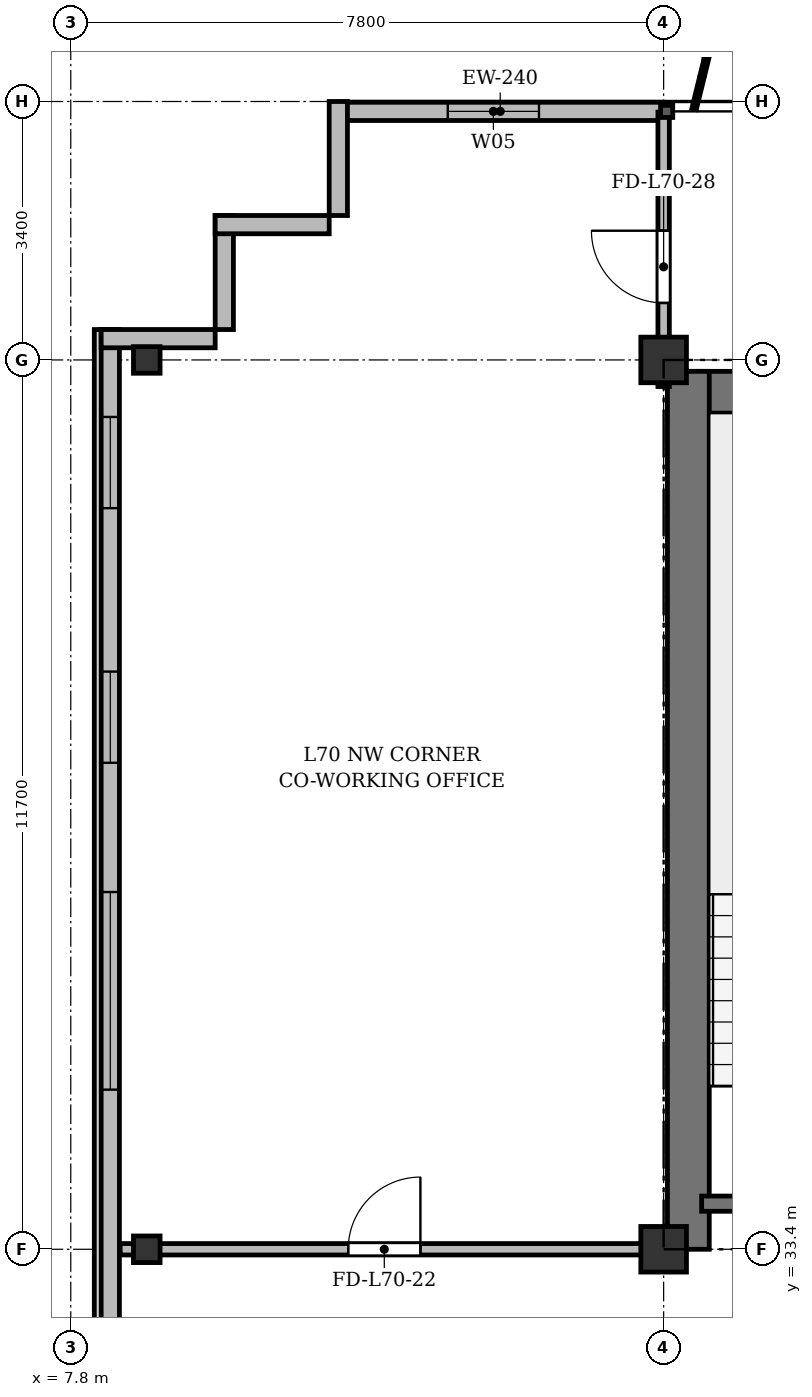
"""IFC4 building model, lengths in metres.
Left out: names, types, materials, properties, quantities, classifications, styles, units other than length and angle.
Written with IfcOpenShell. Run it as: python <this file> out.ifc"""

import sys

from ifc_helpers import new_model, si_unit, direction, frame, frame_2d, origin, origin_2d, place, context, subcontext, project, spatial, rectangle, i_section, extrude, source, transform, mapped, element, fill, save


model = new_model("IFC4")
c1 = context("Model", 3, precision=1e-05, world=origin(), true_north=direction((0.0, 1.0)))
c2 = subcontext(c1, "Body", "Model", "MODEL_VIEW")
j1 = project(units=[si_unit("LENGTHUNIT", "METRE"), si_unit("PLANEANGLEUNIT", "RADIAN")], contexts=[c1])
p1 = place(None, origin())
s1 = spatial("IfcSite", under=j1, at=p1, CompositionType="ELEMENT")
p2 = place(p1, origin())
s2 = spatial("IfcBuilding", under=s1, at=p2, CompositionType="ELEMENT")
p3 = place(p2, frame((0.0, 0.0, 270.3)))
s3 = spatial("IfcBuildingStorey", under=s2, at=p3, CompositionType="ELEMENT", Elevation=270.3)
m1 = source(origin(), c2, "Body", "SweptSolid", [
    extrude(i_section(OverallWidth=0.35, OverallDepth=0.35, WebThickness=0.018, FlangeThickness=0.028, at=origin_2d()), origin(), (0.0, 0.0, 1.0), 3.6),
])
for number, where, z_axis, x_axis in (
    (1, (8.8, 33.4, 0.0), (0.0, 0.0, 1.0), (1.0, 0.0, 0.0)),
    (2, (8.8, 45.1, 0.0), (0.0, 0.0, 1.0), (1.0, 0.0, 0.0)),
):
    element("IfcColumn", number, at=place(p3, frame(where, z_axis=z_axis, x_axis=x_axis)), inside=s3, PredefinedType="COLUMN", context=c2, shape_type="MappedRepresentation", body=[
        mapped(m1, transform((0.0, 0.0, 0.0), x_axis=(1.0, 0.0, 0.0), y_axis=(0.0, 1.0, 0.0), z_axis=(0.0, 0.0, 1.0), scale=1.0)),
    ])
m2 = source(origin(), c2, "Body", "SweptSolid", [
    extrude(rectangle(XDim=0.6, YDim=0.6, at=origin_2d()), origin(), (0.0, 0.0, 1.0), 3.6),
])
for number, where, z_axis, x_axis in (
    (3, (15.6, 33.4, 0.0), (0.0, 0.0, 1.0), (1.0, 0.0, 0.0)),
    (4, (15.6, 45.1, 0.0), (0.0, 0.0, 1.0), (1.0, 0.0, 0.0)),
):
    element("IfcColumn", number, at=place(p3, frame(where, z_axis=z_axis, x_axis=x_axis)), inside=s3, PredefinedType="COLUMN", context=c2, shape_type="MappedRepresentation", body=[
        mapped(m2, transform((0.0, 0.0, 0.0), x_axis=(1.0, 0.0, 0.0), y_axis=(0.0, 1.0, 0.0), z_axis=(0.0, 0.0, 1.0), scale=1.0)),
    ])
p4 = place(p3, frame((11.3, 48.37, 0.0), z_axis=(0.0, 0.0, 1.0), x_axis=(1.0, 0.0, 0.0)))
e5 = element("IfcWall", 5, at=p4, inside=s3, PredefinedType="SOLIDWALL", context=c2, shape_type="SweptSolid", body=[
    extrude(rectangle(XDim=4.3, YDim=0.24, at=frame_2d((2.15, 0.0))), origin(), (0.0, 0.0, 1.0), 3.37),
])
p5 = place(p4, frame((1.46, 0.0, 0.9)))
e6 = element("IfcOpeningElement", 6, at=p5, cuts=e5, PredefinedType="OPENING", context=c2, shape_type="SweptSolid", body=[
    extrude(rectangle(XDim=1.2, YDim=1.65, at=frame_2d((0.6, 0.825))), frame((0.0, 0.13, 0.0), z_axis=(0.0, -1.0, 0.0), x_axis=(1.0, 0.0, 0.0)), (0.0, 0.0, 1.0), 0.26),
])
p6 = place(p3, frame((8.32, 6.5, 0.0), z_axis=(0.0, 0.0, 1.0), x_axis=(0.0, 1.0, 0.0)))
e7 = element("IfcWall", 7, at=p6, inside=s3, PredefinedType="SOLIDWALL", context=c2, shape_type="SweptSolid", body=[
    extrude(rectangle(XDim=39.0, YDim=0.24, at=frame_2d((19.5, 0.0))), origin(), (0.0, 0.0, 1.0), 3.37),
])
p7 = place(p6, frame((1.45, 0.0, 0.92)))
e8 = element("IfcOpeningElement", 8, at=p7, cuts=e7, PredefinedType="OPENING", context=c2, shape_type="SweptSolid", body=[
    extrude(rectangle(XDim=1.2, YDim=1.65, at=frame_2d((0.6, 0.825))), frame((0.0, 0.13, 0.0), z_axis=(0.0, -1.0, 0.0), x_axis=(1.0, 0.0, 0.0)), (0.0, 0.0, 1.0), 0.26),
])
p8 = place(p6, frame((3.6, 0.0, 0.92)))
e9 = element("IfcOpeningElement", 9, at=p8, cuts=e7, PredefinedType="OPENING", context=c2, shape_type="SweptSolid", body=[
    extrude(rectangle(XDim=2.6, YDim=1.9, at=frame_2d((1.3, 0.95))), frame((0.0, 0.13, 0.0), z_axis=(0.0, -1.0, 0.0), x_axis=(1.0, 0.0, 0.0)), (0.0, 0.0, 1.0), 0.26),
])
p9 = place(p6, frame((7.8, 0.0, 0.92)))
e10 = element("IfcOpeningElement", 10, at=p9, cuts=e7, PredefinedType="OPENING", context=c2, shape_type="SweptSolid", body=[
    extrude(rectangle(XDim=2.6, YDim=1.9, at=frame_2d((1.3, 0.95))), frame((0.0, 0.13, 0.0), z_axis=(0.0, -1.0, 0.0), x_axis=(1.0, 0.0, 0.0)), (0.0, 0.0, 1.0), 0.26),
])
p10 = place(p6, frame((15.0, 0.0, 0.92)))
e11 = element("IfcOpeningElement", 11, at=p10, cuts=e7, PredefinedType="OPENING", context=c2, shape_type="SweptSolid", body=[
    extrude(rectangle(XDim=2.6, YDim=1.9, at=frame_2d((1.3, 0.95))), frame((0.0, 0.13, 0.0), z_axis=(0.0, -1.0, 0.0), x_axis=(1.0, 0.0, 0.0)), (0.0, 0.0, 1.0), 0.26),
])
p11 = place(p6, frame((29.0, 0.0, 0.92)))
e12 = element("IfcOpeningElement", 12, at=p11, cuts=e7, PredefinedType="OPENING", context=c2, shape_type="SweptSolid", body=[
    extrude(rectangle(XDim=2.6, YDim=1.9, at=frame_2d((1.3, 0.95))), frame((0.0, 0.13, 0.0), z_axis=(0.0, -1.0, 0.0), x_axis=(1.0, 0.0, 0.0)), (0.0, 0.0, 1.0), 0.26),
])
p12 = place(p6, frame((33.3, 0.0, 0.92)))
e13 = element("IfcOpeningElement", 13, at=p12, cuts=e7, PredefinedType="OPENING", context=c2, shape_type="SweptSolid", body=[
    extrude(rectangle(XDim=1.2, YDim=1.65, at=frame_2d((0.6, 0.825))), frame((0.0, 0.13, 0.0), z_axis=(0.0, -1.0, 0.0), x_axis=(1.0, 0.0, 0.0)), (0.0, 0.0, 1.0), 0.26),
])
p13 = place(p6, frame((36.65, 0.0, 0.92)))
e14 = element("IfcOpeningElement", 14, at=p13, cuts=e7, PredefinedType="OPENING", context=c2, shape_type="SweptSolid", body=[
    extrude(rectangle(XDim=1.2, YDim=1.65, at=frame_2d((0.6, 0.825))), frame((0.0, 0.13, 0.0), z_axis=(0.0, -1.0, 0.0), x_axis=(1.0, 0.0, 0.0)), (0.0, 0.0, 1.0), 0.26),
])
for number, where, z_axis, x_axis in (
    (15, (8.2, 45.38, 0.0), (0.0, 0.0, 1.0), (1.0, 0.0, 0.0)),
    (16, (9.82, 45.5, 0.0), (0.0, 0.0, 1.0), (0.0, 1.0, 0.0)),
    (17, (9.7, 46.88, 0.0), (0.0, 0.0, 1.0), (1.0, 0.0, 0.0)),
    (18, (11.32, 47.0, 0.0), (0.0, 0.0, 1.0), (0.0, 1.0, 0.0)),
):
    element("IfcWall", number, at=place(p3, frame(where, z_axis=z_axis, x_axis=x_axis)), inside=s3, PredefinedType="SOLIDWALL", context=c2, shape_type="SweptSolid", body=[
        extrude(rectangle(XDim=1.5, YDim=0.24, at=frame_2d((0.75, 0.0))), origin(), (0.0, 0.0, 1.0), 3.37),
    ])
p14 = place(p3, frame((15.65, 44.675, 0.0), z_axis=(0.0, 0.0, 1.0), x_axis=(1.0, 0.0, 0.0)))
e19 = element("IfcWall", 19, at=p14, inside=s3, PredefinedType="SHEAR", context=c2, shape_type="SweptSolid", body=[
    extrude(rectangle(XDim=43.1, YDim=0.55, at=frame_2d((21.55, 0.0))), origin(), (0.0, 0.0, 1.0), 3.37),
])
p15 = place(p3, frame((15.925, 33.4, 0.0), z_axis=(0.0, 0.0, 1.0), x_axis=(0.0, 1.0, 0.0)))
e20 = element("IfcWall", 20, at=p15, inside=s3, PredefinedType="SHEAR", context=c2, shape_type="SweptSolid", body=[
    extrude(rectangle(XDim=11.55, YDim=0.55, at=frame_2d((5.775, 0.0))), origin(), (0.0, 0.0, 1.0), 3.37),
])
p16 = place(p3, frame((16.1, 34.0, 0.0), z_axis=(0.0, 0.0, 1.0), x_axis=(1.0, 0.0, 0.0)))
e21 = element("IfcWall", 21, at=p16, inside=s3, PredefinedType="SHEAR", context=c2, shape_type="SweptSolid", body=[
    extrude(rectangle(XDim=3.4, YDim=0.2, at=frame_2d((1.7, 0.0))), origin(), (0.0, 0.0, 1.0), 3.37),
])
p17 = place(p3, frame((8.45, 33.4, 0.0), z_axis=(0.0, 0.0, 1.0), x_axis=(1.0, 0.0, 0.0)))
e22 = element("IfcWall", 22, at=p17, inside=s3, PredefinedType="PARTITIONING", context=c2, shape_type="SweptSolid", body=[
    extrude(rectangle(XDim=7.15, YDim=0.15, at=frame_2d((3.575, 0.0))), origin(), (0.0, 0.0, 1.0), 2.92),
])
p18 = place(p17, frame((3.0, 0.0, 0.0)))
e23 = element("IfcOpeningElement", 23, at=p18, cuts=e22, PredefinedType="OPENING", context=c2, shape_type="SweptSolid", body=[
    extrude(rectangle(XDim=0.95, YDim=2.15, at=frame_2d((0.475, 1.075))), frame((0.0, 0.085, 0.0), z_axis=(0.0, -1.0, 0.0), x_axis=(1.0, 0.0, 0.0)), (0.0, 0.0, 1.0), 0.17),
])
p19 = place(p3, frame((15.6, 44.75, 0.0), z_axis=(0.0, 0.0, 1.0), x_axis=(0.0, 1.0, 0.0)))
e24 = element("IfcWall", 24, at=p19, inside=s3, PredefinedType="PARTITIONING", context=c2, shape_type="SweptSolid", body=[
    extrude(rectangle(XDim=3.61, YDim=0.15, at=frame_2d((1.805, 0.0))), origin(), (0.0, 0.0, 1.0), 2.87),
])
p20 = place(p19, frame((1.1, 0.0, 0.0)))
e25 = element("IfcOpeningElement", 25, at=p20, cuts=e24, PredefinedType="OPENING", context=c2, shape_type="SweptSolid", body=[
    extrude(rectangle(XDim=0.95, YDim=2.15, at=frame_2d((0.475, 1.075))), frame((0.0, 0.085, 0.0), z_axis=(0.0, -1.0, 0.0), x_axis=(1.0, 0.0, 0.0)), (0.0, 0.0, 1.0), 0.17),
])
m3 = source(origin(), c2, "Body", "SweptSolid", [
    extrude(rectangle(XDim=1.2, YDim=1.65, at=frame_2d((0.6, 0.825))), frame((0.0, 0.03, 0.0), z_axis=(0.0, -1.0, 0.0), x_axis=(1.0, 0.0, 0.0)), (0.0, 0.0, 1.0), 0.06),
])
p21 = place(p5, origin())
e26 = element("IfcWindow", 26, at=p21, inside=s3, PartitioningType="SINGLE_PANEL", PredefinedType="WINDOW", context=c2, shape_type="MappedRepresentation", body=[
    mapped(m3, transform((0.0, 0.0, 0.0), x_axis=(1.0, 0.0, 0.0), y_axis=(0.0, 1.0, 0.0), z_axis=(0.0, 0.0, 1.0), scale=1.0)),
])
fill(e6, e26)
m4 = source(origin(), c2, "Body", "SweptSolid", [
    extrude(rectangle(XDim=2.6, YDim=1.9, at=frame_2d((1.3, 0.95))), frame((0.0, 0.03, 0.0), z_axis=(0.0, -1.0, 0.0), x_axis=(1.0, 0.0, 0.0)), (0.0, 0.0, 1.0), 0.06),
])
p22 = place(p11, origin())
e27 = element("IfcWindow", 27, at=p22, inside=s3, PartitioningType="SINGLE_PANEL", PredefinedType="WINDOW", context=c2, shape_type="MappedRepresentation", body=[
    mapped(m4, transform((0.0, 0.0, 0.0), x_axis=(1.0, 0.0, 0.0), y_axis=(0.0, 1.0, 0.0), z_axis=(0.0, 0.0, 1.0), scale=1.0)),
])
fill(e12, e27)
p23 = place(p12, origin())
e28 = element("IfcWindow", 28, at=p23, inside=s3, PartitioningType="SINGLE_PANEL", PredefinedType="WINDOW", context=c2, shape_type="MappedRepresentation", body=[
    mapped(m3, transform((0.0, 0.0, 0.0), x_axis=(1.0, 0.0, 0.0), y_axis=(0.0, 1.0, 0.0), z_axis=(0.0, 0.0, 1.0), scale=1.0)),
])
fill(e13, e28)
p24 = place(p13, origin())
e29 = element("IfcWindow", 29, at=p24, inside=s3, PartitioningType="SINGLE_PANEL", PredefinedType="WINDOW", context=c2, shape_type="MappedRepresentation", body=[
    mapped(m3, transform((0.0, 0.0, 0.0), x_axis=(1.0, 0.0, 0.0), y_axis=(0.0, 1.0, 0.0), z_axis=(0.0, 0.0, 1.0), scale=1.0)),
])
fill(e14, e29)
m5 = source(origin(), c2, "Body", "SweptSolid", [
    extrude(rectangle(XDim=0.95, YDim=2.15, at=frame_2d((0.475, 1.075))), frame((0.0, 0.025, 0.0), z_axis=(0.0, -1.0, 0.0), x_axis=(1.0, 0.0, 0.0)), (0.0, 0.0, 1.0), 0.05),
])
p25 = place(p18, origin())
e30 = element("IfcDoor", 30, at=p25, inside=s3, OperationType="SINGLE_SWING_RIGHT", PredefinedType="DOOR", context=c2, shape_type="MappedRepresentation", body=[
    mapped(m5, transform((0.0, 0.0, 0.0), x_axis=(1.0, 0.0, 0.0), y_axis=(0.0, 1.0, 0.0), z_axis=(0.0, 0.0, 1.0), scale=1.0)),
])
fill(e23, e30)
p26 = place(p20, origin())
e31 = element("IfcDoor", 31, at=p26, inside=s3, OperationType="SINGLE_SWING_RIGHT", PredefinedType="DOOR", context=c2, shape_type="MappedRepresentation", body=[
    mapped(m5, transform((0.0, 0.0, 0.0), x_axis=(1.0, 0.0, 0.0), y_axis=(0.0, 1.0, 0.0), z_axis=(0.0, 0.0, 1.0), scale=1.0)),
])
fill(e25, e31)
save(model, sys.argv[1])
